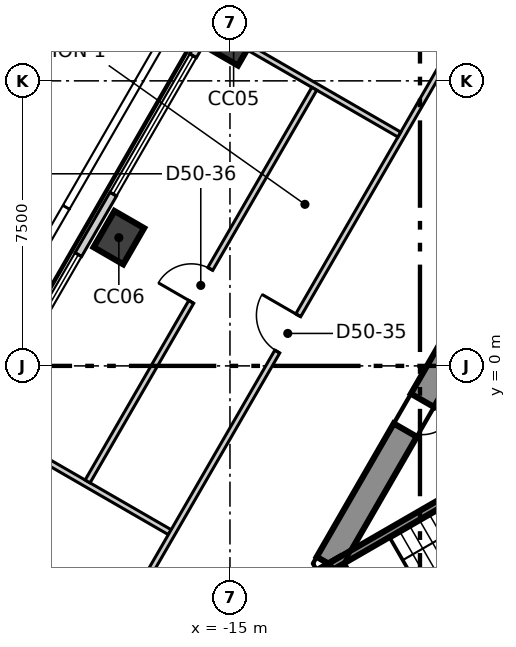
"""IFC4 building model, lengths in metres.
Left out: names, types, materials, properties, quantities, classifications, styles, units other than length and angle.
Written with IfcOpenShell. Run it as: python <this file> out.ifc"""

import sys

from ifc_helpers import new_model, si_unit, direction, frame, frame_2d, origin, origin_2d, place, context, subcontext, project, spatial, polyline, rectangle, outline, extrude, element, fill, save


model = new_model("IFC4")
c1 = context("Model", 3, precision=1e-05, world=origin(), true_north=direction((0.0, 1.0)))
c2 = subcontext(c1, "Body", "Model", "MODEL_VIEW")
j1 = project(units=[si_unit("LENGTHUNIT", "METRE"), si_unit("PLANEANGLEUNIT", "RADIAN")], contexts=[c1])
p1 = place(None, origin())
s1 = spatial("IfcSite", under=j1, at=p1, CompositionType="ELEMENT")
p2 = place(p1, origin())
s2 = spatial("IfcBuilding", under=s1, at=p2, CompositionType="ELEMENT")
p3 = place(p2, frame((0.0, 0.0, 215.3)))
s3 = spatial("IfcBuildingStorey", under=s2, at=p3, CompositionType="ELEMENT", Elevation=215.3)
p4 = place(p3, frame((-1.703, 13.35, -0.3), z_axis=(0.0, 0.0, 1.0), x_axis=(-0.500011533395, -0.866018744874, 0.0)))
e1 = element("IfcWall", 1, at=p4, inside=s3, PredefinedType="SHEAR", context=c2, shape_type="SweptSolid", body=[
    extrude(outline(polyline([(-0.202, -0.35), (1.782, -0.35), (3.766, -0.35), (5.75, -0.35), (7.734, -0.35), (9.718, -0.35), (11.702, -0.35), (13.686, -0.35), (15.67, -0.35), (17.654, -0.35), (19.638, -0.35), (21.622, -0.35), (21.218, 0.35), (19.307, 0.35), (17.397, 0.35), (15.486, 0.35), (13.576, 0.35), (11.665, 0.35), (9.755, 0.35), (7.844, 0.35), (5.934, 0.35), (4.023, 0.35), (2.113, 0.35), (0.202, 0.35), (-0.202, -0.35)])), origin(), (0.0, 0.0, 1.0), 4.0),
])
p5 = place(p4, frame((10.16, 0.0, 0.3)))
e2 = element("IfcOpeningElement", 2, at=p5, cuts=e1, PredefinedType="OPENING", context=c2, shape_type="SweptSolid", body=[
    extrude(rectangle(XDim=1.1, YDim=2.1, at=frame_2d((0.55, 1.05))), frame((0.0, 0.36, 0.0), z_axis=(0.0, -1.0, 0.0), x_axis=(1.0, 0.0, 0.0)), (0.0, 0.0, 1.0), 0.72),
])
p6 = place(p4, frame((16.465, 0.0, 0.3)))
e3 = element("IfcOpeningElement", 3, at=p6, cuts=e1, PredefinedType="OPENING", context=c2, shape_type="SweptSolid", body=[
    extrude(rectangle(XDim=0.9, YDim=2.1, at=frame_2d((0.45, 1.05))), frame((0.0, 0.36, 0.0), z_axis=(0.0, -1.0, 0.0), x_axis=(1.0, 0.0, 0.0)), (0.0, 0.0, 1.0), 0.72),
])
p7 = place(p4, frame((4.005, 0.0, 0.3)))
e4 = element("IfcOpeningElement", 4, at=p7, cuts=e1, PredefinedType="OPENING", context=c2, shape_type="SweptSolid", body=[
    extrude(rectangle(XDim=1.0, YDim=2.1, at=frame_2d((0.5, 1.05))), frame((0.0, 0.36, 0.0), z_axis=(0.0, -1.0, 0.0), x_axis=(1.0, 0.0, 0.0)), (0.0, 0.0, 1.0), 0.72),
])
p8 = place(p3, frame((-12.413, -5.2, -0.3), z_axis=(0.0, 0.0, 1.0), x_axis=(0.49999337185, -0.866029230515, 0.0)))
e5 = element("IfcWall", 5, at=p8, inside=s3, PredefinedType="SHEAR", context=c2, shape_type="SweptSolid", body=[
    extrude(outline(polyline([(-0.202, -0.35), (1.703, -0.35), (3.608, -0.35), (3.204, 0.35), (1.703, 0.35), (0.202, 0.35), (-0.202, -0.35)])), origin(), (0.0, 0.0, 1.0), 4.0),
])
p9 = place(p8, frame((1.003, 0.0, 0.3)))
e6 = element("IfcOpeningElement", 6, at=p9, cuts=e5, PredefinedType="OPENING", context=c2, shape_type="SweptSolid", body=[
    extrude(rectangle(XDim=1.4, YDim=2.1, at=frame_2d((0.7, 1.05))), frame((0.0, 0.36, 0.0), z_axis=(0.0, -1.0, 0.0), x_axis=(1.0, 0.0, 0.0)), (0.0, 0.0, 1.0), 0.72),
])
for number, where, z_axis, x_axis in (
    (7, (-14.904, 8.605, -0.3), (0.0, 0.0, 1.0), (0.5, 0.866, 0.0)),
    (8, (-17.924, 3.374, -0.3), (0.0, 0.0, 1.0), (0.5, 0.866, 0.0)),
):
    element("IfcColumn", number, at=place(p3, frame(where, z_axis=z_axis, x_axis=x_axis)), inside=s3, PredefinedType="COLUMN", context=c2, shape_type="SweptSolid", body=[
        extrude(rectangle(XDim=1.1, YDim=0.9, at=origin_2d()), origin(), (0.0, 0.0, 1.0), 4.0),
    ])
p10 = place(p3, frame((-2.778, 31.008, 0.0), z_axis=(0.0, 0.0, 1.0), x_axis=(-0.499999612413, -0.866025627558, 0.0)))
e9 = element("IfcWall", 9, at=p10, inside=s3, PredefinedType="ELEMENTEDWALL", context=c2, shape_type="SweptSolid", body=[
    extrude(rectangle(XDim=50.91, YDim=0.2, at=frame_2d((25.455, 0.0))), origin(), (0.0, 0.0, 1.0), 3.7),
])
p11 = place(p10, frame((2.223, 0.0, 0.9)))
e10 = element("IfcOpeningElement", 10, at=p11, cuts=e9, PredefinedType="OPENING", context=c2, shape_type="SweptSolid", body=[
    extrude(rectangle(XDim=4.2, YDim=2.5, at=frame_2d((2.1, 1.25))), frame((0.0, 0.11, 0.0), z_axis=(0.0, -1.0, 0.0), x_axis=(1.0, 0.0, 0.0)), (0.0, 0.0, 1.0), 0.22),
])
p12 = place(p10, frame((8.263, 0.0, 0.9)))
e11 = element("IfcOpeningElement", 11, at=p12, cuts=e9, PredefinedType="OPENING", context=c2, shape_type="SweptSolid", body=[
    extrude(rectangle(XDim=4.2, YDim=2.5, at=frame_2d((2.1, 1.25))), frame((0.0, 0.11, 0.0), z_axis=(0.0, -1.0, 0.0), x_axis=(1.0, 0.0, 0.0)), (0.0, 0.0, 1.0), 0.22),
])
p13 = place(p10, frame((14.304, 0.0, 0.9)))
e12 = element("IfcOpeningElement", 12, at=p13, cuts=e9, PredefinedType="OPENING", context=c2, shape_type="SweptSolid", body=[
    extrude(rectangle(XDim=4.2, YDim=2.5, at=frame_2d((2.1, 1.25))), frame((0.0, 0.11, 0.0), z_axis=(0.0, -1.0, 0.0), x_axis=(1.0, 0.0, 0.0)), (0.0, 0.0, 1.0), 0.22),
])
p14 = place(p10, frame((20.344, 0.0, 0.9)))
e13 = element("IfcOpeningElement", 13, at=p14, cuts=e9, PredefinedType="OPENING", context=c2, shape_type="SweptSolid", body=[
    extrude(rectangle(XDim=4.2, YDim=2.5, at=frame_2d((2.1, 1.25))), frame((0.0, 0.11, 0.0), z_axis=(0.0, -1.0, 0.0), x_axis=(1.0, 0.0, 0.0)), (0.0, 0.0, 1.0), 0.22),
])
p15 = place(p10, frame((26.385, 0.0, 0.9)))
e14 = element("IfcOpeningElement", 14, at=p15, cuts=e9, PredefinedType="OPENING", context=c2, shape_type="SweptSolid", body=[
    extrude(rectangle(XDim=4.2, YDim=2.5, at=frame_2d((2.1, 1.25))), frame((0.0, 0.11, 0.0), z_axis=(0.0, -1.0, 0.0), x_axis=(1.0, 0.0, 0.0)), (0.0, 0.0, 1.0), 0.22),
])
p16 = place(p10, frame((32.425, 0.0, 0.9)))
e15 = element("IfcOpeningElement", 15, at=p16, cuts=e9, PredefinedType="OPENING", context=c2, shape_type="SweptSolid", body=[
    extrude(rectangle(XDim=4.2, YDim=2.5, at=frame_2d((2.1, 1.25))), frame((0.0, 0.11, 0.0), z_axis=(0.0, -1.0, 0.0), x_axis=(1.0, 0.0, 0.0)), (0.0, 0.0, 1.0), 0.22),
])
p17 = place(p10, frame((38.466, 0.0, 0.9)))
e16 = element("IfcOpeningElement", 16, at=p17, cuts=e9, PredefinedType="OPENING", context=c2, shape_type="SweptSolid", body=[
    extrude(rectangle(XDim=4.2, YDim=2.5, at=frame_2d((2.1, 1.25))), frame((0.0, 0.11, 0.0), z_axis=(0.0, -1.0, 0.0), x_axis=(1.0, 0.0, 0.0)), (0.0, 0.0, 1.0), 0.22),
])
p18 = place(p10, frame((44.506, 0.0, 0.9)))
e17 = element("IfcOpeningElement", 17, at=p18, cuts=e9, PredefinedType="OPENING", context=c2, shape_type="SweptSolid", body=[
    extrude(rectangle(XDim=4.2, YDim=2.5, at=frame_2d((2.1, 1.25))), frame((0.0, 0.11, 0.0), z_axis=(0.0, -1.0, 0.0), x_axis=(1.0, 0.0, 0.0)), (0.0, 0.0, 1.0), 0.22),
])
p19 = place(p3, frame((-21.481, -1.548, 0.0), z_axis=(0.0, 0.0, 1.0), x_axis=(0.866053291823, -0.49995169339, 0.0)))
e18 = element("IfcWall", 18, at=p19, inside=s3, PredefinedType="PARTITIONING", context=c2, shape_type="SweptSolid", body=[
    extrude(rectangle(XDim=5.654, YDim=0.15, at=frame_2d((2.827, 0.0))), origin(), (0.0, 0.0, 1.0), 3.7),
])
p20 = place(p3, frame((-20.883, -11.97, 0.0), z_axis=(0.0, 0.0, 1.0), x_axis=(0.500006150555, 0.866021852731, 0.0)))
e19 = element("IfcWall", 19, at=p20, inside=s3, PredefinedType="PARTITIONING", context=c2, shape_type="SweptSolid", body=[
    extrude(rectangle(XDim=41.766, YDim=0.15, at=frame_2d((20.883, 0.0))), origin(), (0.0, 0.0, 1.0), 3.7),
])
p21 = place(p20, frame((36.816, 0.0, 0.0)))
e20 = element("IfcOpeningElement", 20, at=p21, cuts=e19, PredefinedType="OPENING", context=c2, shape_type="SweptSolid", body=[
    extrude(rectangle(XDim=1.1, YDim=2.1, at=frame_2d((0.55, 1.05))), frame((0.0, 0.085, 0.0), z_axis=(0.0, -1.0, 0.0), x_axis=(1.0, 0.0, 0.0)), (0.0, 0.0, 1.0), 0.17),
])
p22 = place(p20, frame((23.939, 0.0, 0.0)))
e21 = element("IfcOpeningElement", 21, at=p22, cuts=e19, PredefinedType="OPENING", context=c2, shape_type="SweptSolid", body=[
    extrude(rectangle(XDim=1.1, YDim=2.1, at=frame_2d((0.55, 1.05))), frame((0.0, 0.085, 0.0), z_axis=(0.0, -1.0, 0.0), x_axis=(1.0, 0.0, 0.0)), (0.0, 0.0, 1.0), 0.17),
])
p23 = place(p20, frame((31.139, 0.0, 0.0)))
e22 = element("IfcOpeningElement", 22, at=p23, cuts=e19, PredefinedType="OPENING", context=c2, shape_type="SweptSolid", body=[
    extrude(rectangle(XDim=0.9, YDim=2.1, at=frame_2d((0.45, 1.05))), frame((0.0, 0.085, 0.0), z_axis=(0.0, -1.0, 0.0), x_axis=(1.0, 0.0, 0.0)), (0.0, 0.0, 1.0), 0.17),
])
p24 = place(p20, frame((28.739, 0.0, 0.0)))
e23 = element("IfcOpeningElement", 23, at=p24, cuts=e19, PredefinedType="OPENING", context=c2, shape_type="SweptSolid", body=[
    extrude(rectangle(XDim=0.9, YDim=2.1, at=frame_2d((0.45, 1.05))), frame((0.0, 0.085, 0.0), z_axis=(0.0, -1.0, 0.0), x_axis=(1.0, 0.0, 0.0)), (0.0, 0.0, 1.0), 0.17),
])
p25 = place(p20, frame((14.258, 0.0, 0.0)))
e24 = element("IfcOpeningElement", 24, at=p25, cuts=e19, PredefinedType="OPENING", context=c2, shape_type="SweptSolid", body=[
    extrude(rectangle(XDim=1.1, YDim=2.1, at=frame_2d((0.55, 1.05))), frame((0.0, 0.085, 0.0), z_axis=(0.0, -1.0, 0.0), x_axis=(1.0, 0.0, 0.0)), (0.0, 0.0, 1.0), 0.17),
])
p26 = place(p20, frame((3.777, 0.0, 0.0)))
e25 = element("IfcOpeningElement", 25, at=p26, cuts=e19, PredefinedType="OPENING", context=c2, shape_type="SweptSolid", body=[
    extrude(rectangle(XDim=1.1, YDim=2.1, at=frame_2d((0.55, 1.05))), frame((0.0, 0.085, 0.0), z_axis=(0.0, -1.0, 0.0), x_axis=(1.0, 0.0, 0.0)), (0.0, 0.0, 1.0), 0.17),
])
p27 = place(p3, frame((-15.441, 8.915, 0.0), z_axis=(0.0, 0.0, 1.0), x_axis=(0.866034596441, -0.499984077514, 0.0)))
e26 = element("IfcWall", 26, at=p27, inside=s3, PredefinedType="PARTITIONING", context=c2, shape_type="SweptSolid", body=[
    extrude(rectangle(XDim=5.655, YDim=0.15, at=frame_2d((2.827, 0.0))), origin(), (0.0, 0.0, 1.0), 3.2),
])
p28 = place(p3, frame((-18.746, -3.04, 0.0), z_axis=(0.0, 0.0, 1.0), x_axis=(0.499992887898, 0.866029509919, 0.0)))
e27 = element("IfcWall", 27, at=p28, inside=s3, PredefinedType="PARTITIONING", context=c2, shape_type="SweptSolid", body=[
    extrude(rectangle(XDim=11.93, YDim=0.15, at=frame_2d((5.965, 0.0))), origin(), (0.0, 0.0, 1.0), 3.7),
])
p29 = place(p28, frame((5.456, 0.0, 0.0)))
e28 = element("IfcOpeningElement", 28, at=p29, cuts=e27, PredefinedType="OPENING", context=c2, shape_type="SweptSolid", body=[
    extrude(rectangle(XDim=1.0, YDim=2.1, at=frame_2d((0.5, 1.05))), frame((0.0, 0.085, 0.0), z_axis=(0.0, -1.0, 0.0), x_axis=(1.0, 0.0, 0.0)), (0.0, 0.0, 1.0), 0.17),
])
p30 = place(p3, frame((-12.344, -5.279, 0.0), z_axis=(0.0, 0.0, 1.0), x_axis=(0.866046323291, 0.499963764601, 0.0)))
e29 = element("IfcWall", 29, at=p30, inside=s3, PredefinedType="SOLIDWALL", context=c2, shape_type="SweptSolid", body=[
    extrude(rectangle(XDim=6.714, YDim=0.2, at=frame_2d((3.357, 0.0))), origin(), (0.0, 0.0, 1.0), 3.7),
])
p31 = place(p3, frame((-10.744, -8.051, 0.0), z_axis=(0.0, 0.0, 1.0), x_axis=(0.865983344943, 0.500072840975, 0.0)))
e30 = element("IfcWall", 30, at=p31, inside=s3, PredefinedType="SOLIDWALL", context=c2, shape_type="SweptSolid", body=[
    extrude(rectangle(XDim=6.715, YDim=0.2, at=frame_2d((3.357, 0.0))), origin(), (0.0, 0.0, 1.0), 3.7),
])
p32 = place(p15, origin())
e31 = element("IfcWindow", 31, at=p32, inside=s3, PartitioningType="SINGLE_PANEL", PredefinedType="WINDOW", context=c2, shape_type="SweptSolid", body=[
    extrude(rectangle(XDim=4.2, YDim=2.5, at=frame_2d((2.1, 1.25))), frame((0.0, 0.03, 0.0), z_axis=(0.0, -1.0, 0.0), x_axis=(1.0, 0.0, 0.0)), (0.0, 0.0, 1.0), 0.06),
])
fill(e14, e31)
p33 = place(p16, origin())
e32 = element("IfcWindow", 32, at=p33, inside=s3, PartitioningType="SINGLE_PANEL", PredefinedType="WINDOW", context=c2, shape_type="SweptSolid", body=[
    extrude(rectangle(XDim=4.2, YDim=2.5, at=frame_2d((2.1, 1.25))), frame((0.0, 0.03, 0.0), z_axis=(0.0, -1.0, 0.0), x_axis=(1.0, 0.0, 0.0)), (0.0, 0.0, 1.0), 0.06),
])
fill(e15, e32)
p34 = place(p25, origin())
e33 = element("IfcDoor", 33, at=p34, inside=s3, OperationType="SINGLE_SWING_LEFT", PredefinedType="DOOR", context=c2, shape_type="SweptSolid", body=[
    extrude(rectangle(XDim=1.1, YDim=2.1, at=frame_2d((0.55, 1.05))), frame((0.0, 0.025, 0.0), z_axis=(0.0, -1.0, 0.0), x_axis=(1.0, 0.0, 0.0)), (0.0, 0.0, 1.0), 0.05),
])
fill(e24, e33)
p35 = place(p29, origin())
e34 = element("IfcDoor", 34, at=p35, inside=s3, OperationType="SINGLE_SWING_RIGHT", PredefinedType="DOOR", context=c2, shape_type="SweptSolid", body=[
    extrude(rectangle(XDim=1.0, YDim=2.1, at=frame_2d((0.5, 1.05))), frame((0.0, 0.025, 0.0), z_axis=(0.0, -1.0, 0.0), x_axis=(1.0, 0.0, 0.0)), (0.0, 0.0, 1.0), 0.05),
])
fill(e28, e34)
p36 = place(p6, origin())
e35 = element("IfcDoor", 35, at=p36, inside=s3, OperationType="SINGLE_SWING_RIGHT", PredefinedType="DOOR", context=c2, shape_type="SweptSolid", body=[
    extrude(rectangle(XDim=0.9, YDim=2.1, at=frame_2d((0.45, 1.05))), frame((0.0, 0.025, 0.0), z_axis=(0.0, -1.0, 0.0), x_axis=(1.0, 0.0, 0.0)), (0.0, 0.0, 1.0), 0.05),
])
fill(e3, e35)
save(model, sys.argv[1])
